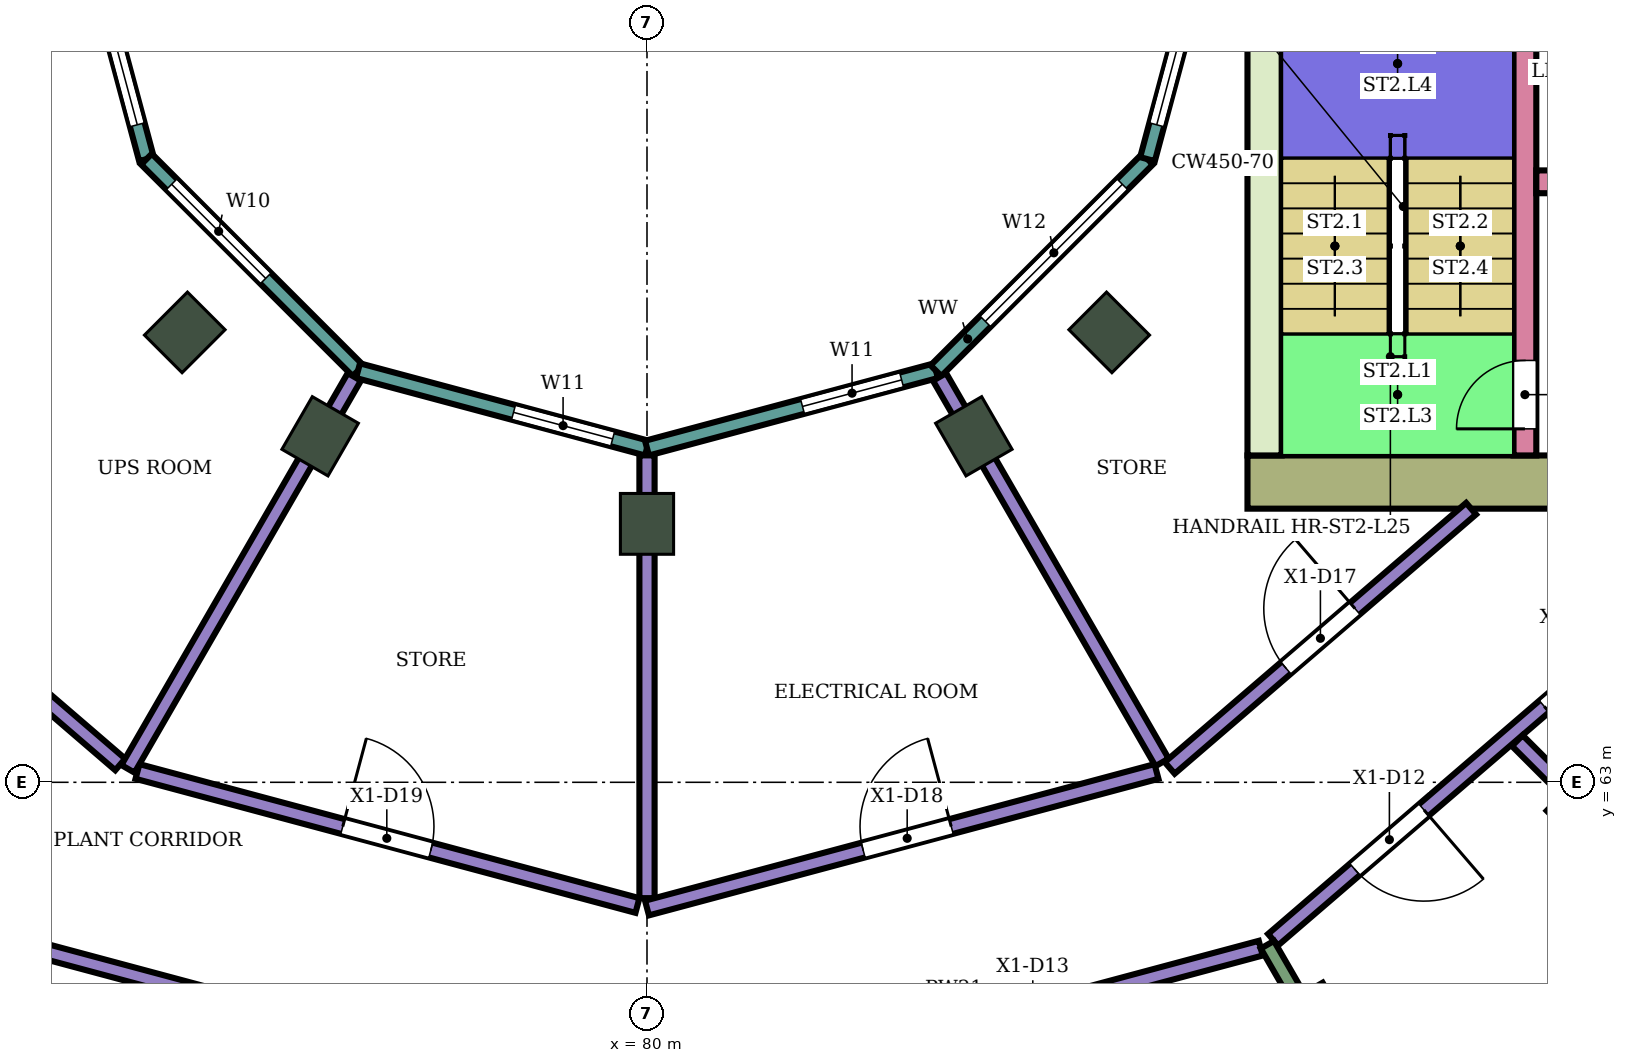
"""IFC4 building model, lengths in metres.
Left out: names, types, materials, properties, quantities, classifications, styles, units other than length and angle.
Written with IfcOpenShell. Run it as: python <this file> out.ifc"""

import sys

from ifc_helpers import new_model, si_unit, direction, frame, frame_2d, origin, origin_2d, place, context, subcontext, project, spatial, rectangle, extrude, element, fill, save


model = new_model("IFC4")
c1 = context("Model", 3, precision=1e-05, world=origin(), true_north=direction((0.0, 1.0)))
c2 = subcontext(c1, "Body", "Model", "MODEL_VIEW")
j1 = project(units=[si_unit("LENGTHUNIT", "METRE"), si_unit("PLANEANGLEUNIT", "RADIAN")], contexts=[c1])
p1 = place(None, origin())
s1 = spatial("IfcSite", under=j1, at=p1, CompositionType="ELEMENT")
p2 = place(p1, origin())
s2 = spatial("IfcBuilding", under=s1, at=p2, CompositionType="ELEMENT")
p3 = place(p2, frame((0.0, 0.0, 109.0)))
s3 = spatial("IfcBuildingStorey", under=s2, at=p3, CompositionType="ELEMENT", Elevation=109.0)
for number, where, z_axis, x_axis in (
    (1, (88.8, 59.758, 0.0), (0.0, 0.0, 1.0), (0.5, -0.866, 0.0)),
    (2, (92.445, 62.555, 0.0), (0.0, 0.0, 1.0), (0.707, -0.707, 0.0)),
):
    element("IfcColumn", number, at=place(p3, frame(where, z_axis=z_axis, x_axis=x_axis)), inside=s3, PredefinedType="COLUMN", context=c2, shape_type="SweptSolid", body=[
        extrude(rectangle(XDim=1.0, YDim=0.8, at=origin_2d()), origin(), (0.0, 0.0, 1.0), 5.6),
    ])
for number, where, z_axis, x_axis in (
    (3, (73.919, 68.919, 0.0), (0.0, 0.0, 1.0), (-0.707, -0.707, 0.0)),
    (4, (75.7, 67.552, 0.0), (0.0, 0.0, 1.0), (-0.5, -0.866, 0.0)),
    (5, (80.0, 66.4, 0.0), (0.0, 0.0, 1.0), (0.0, -1.0, 0.0)),
    (6, (84.3, 67.552, 0.0), (0.0, 0.0, 1.0), (0.5, -0.866, 0.0)),
    (7, (86.081, 68.919, 0.0), (0.0, 0.0, 1.0), (0.707, -0.707, 0.0)),
):
    element("IfcColumn", number, at=place(p3, frame(where, z_axis=z_axis, x_axis=x_axis)), inside=s3, PredefinedType="COLUMN", context=c2, shape_type="SweptSolid", body=[
        extrude(rectangle(XDim=0.8, YDim=0.7, at=origin_2d()), origin(), (0.0, 0.0, 1.0), 5.6),
    ])
p4 = place(p3, frame((87.9, 66.95, 0.0), z_axis=(0.0, 0.0, 1.0), x_axis=(1.0, 0.0, 0.0)))
e8 = element("IfcWall", 8, at=p4, inside=s3, PredefinedType="SHEAR", context=c2, shape_type="SweptSolid", body=[
    extrude(rectangle(XDim=14.8, YDim=0.7, at=frame_2d((7.4, 0.0))), origin(), (0.0, 0.0, 1.0), 5.28),
])
p5 = place(p4, frame((4.2, 0.0, 0.0)))
e9 = element("IfcOpeningElement", 9, at=p5, cuts=e8, PredefinedType="OPENING", context=c2, shape_type="SweptSolid", body=[
    extrude(rectangle(XDim=2.4, YDim=2.4, at=frame_2d((1.2, 1.2))), frame((0.0, 0.36, 0.0), z_axis=(0.0, -1.0, 0.0), x_axis=(1.0, 0.0, 0.0)), (0.0, 0.0, 1.0), 0.72),
])
p6 = place(p3, frame((88.125, 67.3, 0.0), z_axis=(0.0, 0.0, 1.0), x_axis=(0.0, 1.0, 0.0)))
e10 = element("IfcWall", 10, at=p6, inside=s3, PredefinedType="SHEAR", context=c2, shape_type="SweptSolid", body=[
    extrude(rectangle(XDim=7.7, YDim=0.45, at=frame_2d((3.85, 0.0))), origin(), (0.0, 0.0, 1.0), 5.28),
])
p7 = place(p3, frame((91.55, 67.3, 0.0), z_axis=(0.0, 0.0, 1.0), x_axis=(0.0, 1.0, 0.0)))
e11 = element("IfcWall", 11, at=p7, inside=s3, PredefinedType="SHEAR", context=c2, shape_type="SweptSolid", body=[
    extrude(rectangle(XDim=7.7, YDim=0.3, at=frame_2d((3.85, 0.0))), origin(), (0.0, 0.0, 1.0), 5.28),
])
p8 = place(p7, frame((0.35, 0.0, 0.0)))
e12 = element("IfcOpeningElement", 12, at=p8, cuts=e11, PredefinedType="OPENING", context=c2, shape_type="SweptSolid", body=[
    extrude(rectangle(XDim=0.9, YDim=2.1, at=frame_2d((0.45, 1.05))), frame((0.0, 0.16, 0.0), z_axis=(0.0, -1.0, 0.0), x_axis=(1.0, 0.0, 0.0)), (0.0, 0.0, 1.0), 0.32),
])
p9 = place(p3, frame((91.7, 70.9, 0.0), z_axis=(0.0, 0.0, 1.0), x_axis=(1.0, 0.0, 0.0)))
e13 = element("IfcWall", 13, at=p9, inside=s3, PredefinedType="SHEAR", context=c2, shape_type="SweptSolid", body=[
    extrude(rectangle(XDim=11.0, YDim=0.3, at=frame_2d((5.5, 0.0))), origin(), (0.0, 0.0, 1.0), 5.28),
])
p10 = place(p9, frame((0.4, 0.0, 0.0)))
e14 = element("IfcOpeningElement", 14, at=p10, cuts=e13, PredefinedType="OPENING", context=c2, shape_type="SweptSolid", body=[
    extrude(rectangle(XDim=1.4, YDim=2.1, at=frame_2d((0.7, 1.05))), frame((0.0, 0.16, 0.0), z_axis=(0.0, -1.0, 0.0), x_axis=(1.0, 0.0, 0.0)), (0.0, 0.0, 1.0), 0.32),
])
p11 = place(p9, frame((5.4, 0.0, 0.0)))
e15 = element("IfcOpeningElement", 15, at=p11, cuts=e13, PredefinedType="OPENING", context=c2, shape_type="SweptSolid", body=[
    extrude(rectangle(XDim=1.4, YDim=2.1, at=frame_2d((0.7, 1.05))), frame((0.0, 0.16, 0.0), z_axis=(0.0, -1.0, 0.0), x_axis=(1.0, 0.0, 0.0)), (0.0, 0.0, 1.0), 0.32),
])
p12 = place(p9, frame((8.1, 0.0, 0.0)))
e16 = element("IfcOpeningElement", 16, at=p12, cuts=e13, PredefinedType="OPENING", context=c2, shape_type="SweptSolid", body=[
    extrude(rectangle(XDim=1.0, YDim=2.1, at=frame_2d((0.5, 1.05))), frame((0.0, 0.16, 0.0), z_axis=(0.0, -1.0, 0.0), x_axis=(1.0, 0.0, 0.0)), (0.0, 0.0, 1.0), 0.32),
])
p13 = place(p3, frame((72.396, 75.0, 0.0), z_axis=(0.0, 0.0, 1.0), x_axis=(0.258789828301, -0.965933654434, 0.0)))
e17 = element("IfcWall", 17, at=p13, inside=s3, PredefinedType="NOTDEFINED", context=c2, shape_type="SweptSolid", body=[
    extrude(rectangle(XDim=3.936, YDim=0.2, at=frame_2d((1.968, 0.0))), origin(), (0.0, 0.0, 1.0), 5.6),
])
p14 = place(p13, frame((0.468, 0.0, 0.9)))
e18 = element("IfcOpeningElement", 18, at=p14, cuts=e17, PredefinedType="OPENING", context=c2, shape_type="SweptSolid", body=[
    extrude(rectangle(XDim=3.0, YDim=2.3, at=frame_2d((1.5, 1.15))), frame((0.0, 0.11, 0.0), z_axis=(0.0, -1.0, 0.0), x_axis=(1.0, 0.0, 0.0)), (0.0, 0.0, 1.0), 0.22),
])
p15 = place(p3, frame((73.415, 71.198, 0.0), z_axis=(0.0, 0.0, 1.0), x_axis=(0.707106781187, -0.707106781187, 0.0)))
e19 = element("IfcWall", 19, at=p15, inside=s3, PredefinedType="NOTDEFINED", context=c2, shape_type="SweptSolid", body=[
    extrude(rectangle(XDim=3.936, YDim=0.2, at=frame_2d((1.968, 0.0))), origin(), (0.0, 0.0, 1.0), 5.6),
])
p16 = place(p15, frame((0.468, 0.0, 0.9)))
e20 = element("IfcOpeningElement", 20, at=p16, cuts=e19, PredefinedType="OPENING", context=c2, shape_type="SweptSolid", body=[
    extrude(rectangle(XDim=1.75, YDim=2.3, at=frame_2d((0.875, 1.15))), frame((0.0, 0.11, 0.0), z_axis=(0.0, -1.0, 0.0), x_axis=(1.0, 0.0, 0.0)), (0.0, 0.0, 1.0), 0.22),
])
p17 = place(p3, frame((76.198, 68.415, 0.0), z_axis=(0.0, 0.0, 1.0), x_axis=(0.965933654434, -0.258789828301, 0.0)))
e21 = element("IfcWall", 21, at=p17, inside=s3, PredefinedType="NOTDEFINED", context=c2, shape_type="SweptSolid", body=[
    extrude(rectangle(XDim=3.936, YDim=0.2, at=frame_2d((1.968, 0.0))), origin(), (0.0, 0.0, 1.0), 5.6),
])
p18 = place(p17, frame((2.118, 0.0, 0.9)))
e22 = element("IfcOpeningElement", 22, at=p18, cuts=e21, PredefinedType="OPENING", context=c2, shape_type="SweptSolid", body=[
    extrude(rectangle(XDim=1.35, YDim=2.3, at=frame_2d((0.675, 1.15))), frame((0.0, 0.11, 0.0), z_axis=(0.0, -1.0, 0.0), x_axis=(1.0, 0.0, 0.0)), (0.0, 0.0, 1.0), 0.22),
])
p19 = place(p3, frame((80.0, 67.396, 0.0), z_axis=(0.0, 0.0, 1.0), x_axis=(0.965933654434, 0.258789828301, 0.0)))
e23 = element("IfcWall", 23, at=p19, inside=s3, PredefinedType="NOTDEFINED", context=c2, shape_type="SweptSolid", body=[
    extrude(rectangle(XDim=3.936, YDim=0.2, at=frame_2d((1.968, 0.0))), origin(), (0.0, 0.0, 1.0), 5.6),
])
p20 = place(p19, frame((2.118, 0.0, 0.9)))
e24 = element("IfcOpeningElement", 24, at=p20, cuts=e23, PredefinedType="OPENING", context=c2, shape_type="SweptSolid", body=[
    extrude(rectangle(XDim=1.35, YDim=2.3, at=frame_2d((0.675, 1.15))), frame((0.0, 0.11, 0.0), z_axis=(0.0, -1.0, 0.0), x_axis=(1.0, 0.0, 0.0)), (0.0, 0.0, 1.0), 0.22),
])
p21 = place(p3, frame((83.802, 68.415, 0.0), z_axis=(0.0, 0.0, 1.0), x_axis=(0.707106781187, 0.707106781187, 0.0)))
e25 = element("IfcWall", 25, at=p21, inside=s3, PredefinedType="NOTDEFINED", context=c2, shape_type="SweptSolid", body=[
    extrude(rectangle(XDim=3.936, YDim=0.2, at=frame_2d((1.968, 0.0))), origin(), (0.0, 0.0, 1.0), 5.6),
])
p22 = place(p21, frame((0.918, 0.0, 0.9)))
e26 = element("IfcOpeningElement", 26, at=p22, cuts=e25, PredefinedType="OPENING", context=c2, shape_type="SweptSolid", body=[
    extrude(rectangle(XDim=2.55, YDim=2.3, at=frame_2d((1.275, 1.15))), frame((0.0, 0.11, 0.0), z_axis=(0.0, -1.0, 0.0), x_axis=(1.0, 0.0, 0.0)), (0.0, 0.0, 1.0), 0.22),
])
p23 = place(p3, frame((86.585, 71.198, 0.0), z_axis=(0.0, 0.0, 1.0), x_axis=(0.258789828301, 0.965933654434, 0.0)))
e27 = element("IfcWall", 27, at=p23, inside=s3, PredefinedType="NOTDEFINED", context=c2, shape_type="SweptSolid", body=[
    extrude(rectangle(XDim=3.936, YDim=0.2, at=frame_2d((1.968, 0.0))), origin(), (0.0, 0.0, 1.0), 5.6),
])
p24 = place(p23, frame((0.468, 0.0, 0.9)))
e28 = element("IfcOpeningElement", 28, at=p24, cuts=e27, PredefinedType="OPENING", context=c2, shape_type="SweptSolid", body=[
    extrude(rectangle(XDim=3.0, YDim=2.3, at=frame_2d((1.5, 1.15))), frame((0.0, 0.11, 0.0), z_axis=(0.0, -1.0, 0.0), x_axis=(1.0, 0.0, 0.0)), (0.0, 0.0, 1.0), 0.22),
])
p25 = place(p3, frame((69.158, 66.6, 0.0), z_axis=(0.0, 0.0, 1.0), x_axis=(0.758063092745, -0.652181222835, 0.0)))
e29 = element("IfcWall", 29, at=p25, inside=s3, PredefinedType="PARTITIONING", context=c2, shape_type="SweptSolid", body=[
    extrude(rectangle(XDim=5.16, YDim=0.2, at=frame_2d((2.58, 0.0))), origin(), (0.0, 0.0, 1.0), 5.15),
])
p26 = place(p25, frame((2.015, 0.0, 0.0)))
e30 = element("IfcOpeningElement", 30, at=p26, cuts=e29, PredefinedType="OPENING", context=c2, shape_type="SweptSolid", body=[
    extrude(rectangle(XDim=1.2, YDim=2.4, at=frame_2d((0.6, 1.2))), frame((0.0, 0.11, 0.0), z_axis=(0.0, -1.0, 0.0), x_axis=(1.0, 0.0, 0.0)), (0.0, 0.0, 1.0), 0.22),
])
p27 = place(p3, frame((71.877, 60.831, 0.0), z_axis=(0.0, 0.0, 1.0), x_axis=(0.965893155099, -0.258940944876, 0.0)))
e31 = element("IfcWall", 31, at=p27, inside=s3, PredefinedType="PARTITIONING", context=c2, shape_type="SweptSolid", body=[
    extrude(rectangle(XDim=8.32, YDim=0.2, at=frame_2d((4.16, 0.0))), origin(), (0.0, 0.0, 1.0), 5.15),
])
p28 = place(p27, frame((5.685, 0.0, 0.0)))
e32 = element("IfcOpeningElement", 32, at=p28, cuts=e31, PredefinedType="OPENING", context=c2, shape_type="SweptSolid", body=[
    extrude(rectangle(XDim=1.2, YDim=2.4, at=frame_2d((0.6, 1.2))), frame((0.0, 0.11, 0.0), z_axis=(0.0, -1.0, 0.0), x_axis=(1.0, 0.0, 0.0)), (0.0, 0.0, 1.0), 0.22),
])
p29 = place(p3, frame((73.297, 63.143, 0.0), z_axis=(0.0, 0.0, 1.0), x_axis=(0.965899714105, -0.258916477443, 0.0)))
e33 = element("IfcWall", 33, at=p29, inside=s3, PredefinedType="PARTITIONING", context=c2, shape_type="SweptSolid", body=[
    extrude(rectangle(XDim=6.81, YDim=0.2, at=frame_2d((3.405, 0.0))), origin(), (0.0, 0.0, 1.0), 5.15),
])
p30 = place(p29, frame((2.796, 0.0, 0.0)))
e34 = element("IfcOpeningElement", 34, at=p30, cuts=e33, PredefinedType="OPENING", context=c2, shape_type="SweptSolid", body=[
    extrude(rectangle(XDim=1.2, YDim=2.4, at=frame_2d((0.6, 1.2))), frame((0.0, 0.11, 0.0), z_axis=(0.0, -1.0, 0.0), x_axis=(1.0, 0.0, 0.0)), (0.0, 0.0, 1.0), 0.22),
])
p31 = place(p3, frame((73.172, 63.177, 0.0), z_axis=(0.0, 0.0, 1.0), x_axis=(0.500080872431, 0.86597870703, 0.0)))
e35 = element("IfcWall", 35, at=p31, inside=s3, PredefinedType="PARTITIONING", context=c2, shape_type="SweptSolid", body=[
    extrude(rectangle(XDim=5.955, YDim=0.2, at=frame_2d((2.978, 0.0))), origin(), (0.0, 0.0, 1.0), 5.15),
])
p32 = place(p3, frame((80.0, 58.654, 0.0), z_axis=(0.0, 0.0, 1.0), x_axis=(0.965905026676, 0.258896657842, 0.0)))
e36 = element("IfcWall", 36, at=p32, inside=s3, PredefinedType="PARTITIONING", context=c2, shape_type="SweptSolid", body=[
    extrude(rectangle(XDim=8.36, YDim=0.2, at=frame_2d((4.18, 0.0))), origin(), (0.0, 0.0, 1.0), 5.15),
])
p33 = place(p32, frame((4.655, 0.0, 0.0)))
e37 = element("IfcOpeningElement", 37, at=p33, cuts=e36, PredefinedType="OPENING", context=c2, shape_type="SweptSolid", body=[
    extrude(rectangle(XDim=1.2, YDim=2.4, at=frame_2d((0.6, 1.2))), frame((0.0, 0.11, 0.0), z_axis=(0.0, -1.0, 0.0), x_axis=(1.0, 0.0, 0.0)), (0.0, 0.0, 1.0), 0.22),
])
p34 = place(p3, frame((80.0, 61.476, 0.0), z_axis=(0.0, 0.0, 1.0), x_axis=(0.0, 1.0, 0.0)))
e38 = element("IfcWall", 38, at=p34, inside=s3, PredefinedType="PARTITIONING", context=c2, shape_type="SweptSolid", body=[
    extrude(rectangle(XDim=5.825, YDim=0.2, at=frame_2d((2.913, 0.0))), origin(), (0.0, 0.0, 1.0), 5.15),
])
p35 = place(p3, frame((80.0, 61.346, 0.0), z_axis=(0.0, 0.0, 1.0), x_axis=(0.965915385935, 0.25885800589, 0.0)))
e39 = element("IfcWall", 39, at=p35, inside=s3, PredefinedType="PARTITIONING", context=c2, shape_type="SweptSolid", body=[
    extrude(rectangle(XDim=6.94, YDim=0.2, at=frame_2d((3.47, 0.0))), origin(), (0.0, 0.0, 1.0), 5.15),
])
p36 = place(p35, frame((2.944, 0.0, 0.0)))
e40 = element("IfcOpeningElement", 40, at=p36, cuts=e39, PredefinedType="OPENING", context=c2, shape_type="SweptSolid", body=[
    extrude(rectangle(XDim=1.2, YDim=2.4, at=frame_2d((0.6, 1.2))), frame((0.0, 0.11, 0.0), z_axis=(0.0, -1.0, 0.0), x_axis=(1.0, 0.0, 0.0)), (0.0, 0.0, 1.0), 0.22),
])
p37 = place(p3, frame((83.849, 68.333, 0.0), z_axis=(0.0, 0.0, 1.0), x_axis=(0.499951054106, -0.866053660865, 0.0)))
e41 = element("IfcWall", 41, at=p37, inside=s3, PredefinedType="PARTITIONING", context=c2, shape_type="SweptSolid", body=[
    extrude(rectangle(XDim=5.855, YDim=0.2, at=frame_2d((2.927, 0.0))), origin(), (0.0, 0.0, 1.0), 5.15),
])
p38 = place(p3, frame((86.877, 63.189, 0.0), z_axis=(0.0, 0.0, 1.0), x_axis=(0.758075808328, 0.652166442581, 0.0)))
e42 = element("IfcWall", 42, at=p38, inside=s3, PredefinedType="PARTITIONING", context=c2, shape_type="SweptSolid", body=[
    extrude(rectangle(XDim=5.23, YDim=0.2, at=frame_2d((2.615, 0.0))), origin(), (0.0, 0.0, 1.0), 5.15),
])
p39 = place(p38, frame((2.015, 0.0, 0.0)))
e43 = element("IfcOpeningElement", 43, at=p39, cuts=e42, PredefinedType="OPENING", context=c2, shape_type="SweptSolid", body=[
    extrude(rectangle(XDim=1.2, YDim=2.4, at=frame_2d((0.6, 1.2))), frame((0.0, 0.11, 0.0), z_axis=(0.0, -1.0, 0.0), x_axis=(1.0, 0.0, 0.0)), (0.0, 0.0, 1.0), 0.22),
])
p40 = place(p3, frame((88.237, 60.929, 0.0), z_axis=(0.0, 0.0, 1.0), x_axis=(0.758121184653, 0.6521136936, 0.0)))
e44 = element("IfcWall", 44, at=p40, inside=s3, PredefinedType="PARTITIONING", context=c2, shape_type="SweptSolid", body=[
    extrude(rectangle(XDim=6.336, YDim=0.2, at=frame_2d((3.168, 0.0))), origin(), (0.0, 0.0, 1.0), 5.15),
])
p41 = place(p40, frame((4.707, 0.0, 0.0)))
e45 = element("IfcOpeningElement", 45, at=p41, cuts=e44, PredefinedType="OPENING", context=c2, shape_type="SweptSolid", body=[
    extrude(rectangle(XDim=1.1, YDim=2.1, at=frame_2d((0.55, 1.05))), frame((0.0, 0.11, 0.0), z_axis=(0.0, -1.0, 0.0), x_axis=(1.0, 0.0, 0.0)), (0.0, 0.0, 1.0), 0.22),
])
p42 = place(p40, frame((1.419, 0.0, 0.0)))
e46 = element("IfcOpeningElement", 46, at=p42, cuts=e44, PredefinedType="OPENING", context=c2, shape_type="SweptSolid", body=[
    extrude(rectangle(XDim=1.2, YDim=2.4, at=frame_2d((0.6, 1.2))), frame((0.0, 0.11, 0.0), z_axis=(0.0, -1.0, 0.0), x_axis=(1.0, 0.0, 0.0)), (0.0, 0.0, 1.0), 0.22),
])
p43 = place(p3, frame((88.162, 60.863, 0.0), z_axis=(0.0, 0.0, 1.0), x_axis=(0.499991628305, -0.866030237131, 0.0)))
e47 = element("IfcWall", 47, at=p43, inside=s3, PredefinedType="PARTITIONING", context=c2, shape_type="SweptSolid", body=[
    extrude(rectangle(XDim=9.474, YDim=0.2, at=frame_2d((4.737, 0.0))), origin(), (0.0, 0.0, 1.0), 4.586),
])
p44 = place(p3, frame((91.45, 63.548, 0.0), z_axis=(0.0, 0.0, 1.0), x_axis=(0.707037084594, -0.70717647091, 0.0)))
e48 = element("IfcWall", 48, at=p44, inside=s3, PredefinedType="PARTITIONING", context=c2, shape_type="SweptSolid", body=[
    extrude(rectangle(XDim=7.006, YDim=0.2, at=frame_2d((3.503, 0.0))), origin(), (0.0, 0.0, 1.0), 5.15),
])
p45 = place(p14, origin())
e49 = element("IfcWindow", 49, at=p45, inside=s3, PartitioningType="SINGLE_PANEL", PredefinedType="WINDOW", context=c2, shape_type="SweptSolid", body=[
    extrude(rectangle(XDim=3.0, YDim=2.3, at=frame_2d((1.5, 1.15))), frame((0.0, 0.03, 0.0), z_axis=(0.0, -1.0, 0.0), x_axis=(1.0, 0.0, 0.0)), (0.0, 0.0, 1.0), 0.06),
])
fill(e18, e49)
p46 = place(p16, origin())
e50 = element("IfcWindow", 50, at=p46, inside=s3, PartitioningType="SINGLE_PANEL", PredefinedType="WINDOW", context=c2, shape_type="SweptSolid", body=[
    extrude(rectangle(XDim=1.75, YDim=2.3, at=frame_2d((0.875, 1.15))), frame((0.0, 0.03, 0.0), z_axis=(0.0, -1.0, 0.0), x_axis=(1.0, 0.0, 0.0)), (0.0, 0.0, 1.0), 0.06),
])
fill(e20, e50)
p47 = place(p18, origin())
e51 = element("IfcWindow", 51, at=p47, inside=s3, PartitioningType="SINGLE_PANEL", PredefinedType="WINDOW", context=c2, shape_type="SweptSolid", body=[
    extrude(rectangle(XDim=1.35, YDim=2.3, at=frame_2d((0.675, 1.15))), frame((0.0, 0.03, 0.0), z_axis=(0.0, -1.0, 0.0), x_axis=(1.0, 0.0, 0.0)), (0.0, 0.0, 1.0), 0.06),
])
fill(e22, e51)
p48 = place(p20, origin())
e52 = element("IfcWindow", 52, at=p48, inside=s3, PartitioningType="SINGLE_PANEL", PredefinedType="WINDOW", context=c2, shape_type="SweptSolid", body=[
    extrude(rectangle(XDim=1.35, YDim=2.3, at=frame_2d((0.675, 1.15))), frame((0.0, 0.03, 0.0), z_axis=(0.0, -1.0, 0.0), x_axis=(1.0, 0.0, 0.0)), (0.0, 0.0, 1.0), 0.06),
])
fill(e24, e52)
p49 = place(p22, origin())
e53 = element("IfcWindow", 53, at=p49, inside=s3, PartitioningType="SINGLE_PANEL", PredefinedType="WINDOW", context=c2, shape_type="SweptSolid", body=[
    extrude(rectangle(XDim=2.55, YDim=2.3, at=frame_2d((1.275, 1.15))), frame((0.0, 0.03, 0.0), z_axis=(0.0, -1.0, 0.0), x_axis=(1.0, 0.0, 0.0)), (0.0, 0.0, 1.0), 0.06),
])
fill(e26, e53)
p50 = place(p24, origin())
e54 = element("IfcWindow", 54, at=p50, inside=s3, PartitioningType="SINGLE_PANEL", PredefinedType="WINDOW", context=c2, shape_type="SweptSolid", body=[
    extrude(rectangle(XDim=3.0, YDim=2.3, at=frame_2d((1.5, 1.15))), frame((0.0, 0.03, 0.0), z_axis=(0.0, -1.0, 0.0), x_axis=(1.0, 0.0, 0.0)), (0.0, 0.0, 1.0), 0.06),
])
fill(e28, e54)
p51 = place(p41, frame((1.1, 0.0, 0.0), z_axis=(0.0, 0.0, 1.0), x_axis=(-1.0, 0.0, 0.0)))
e55 = element("IfcDoor", 55, at=p51, inside=s3, OperationType="SINGLE_SWING_RIGHT", PredefinedType="DOOR", context=c2, shape_type="SweptSolid", body=[
    extrude(rectangle(XDim=1.1, YDim=2.1, at=frame_2d((0.55, 1.05))), frame((0.0, 0.025, 0.0), z_axis=(0.0, -1.0, 0.0), x_axis=(1.0, 0.0, 0.0)), (0.0, 0.0, 1.0), 0.05),
])
fill(e45, e55)
p52 = place(p42, frame((1.2, 0.0, 0.0), z_axis=(0.0, 0.0, 1.0), x_axis=(-1.0, 0.0, 0.0)))
e56 = element("IfcDoor", 56, at=p52, inside=s3, OperationType="SINGLE_SWING_LEFT", PredefinedType="DOOR", context=c2, shape_type="SweptSolid", body=[
    extrude(rectangle(XDim=1.2, YDim=2.4, at=frame_2d((0.6, 1.2))), frame((0.0, 0.025, 0.0), z_axis=(0.0, -1.0, 0.0), x_axis=(1.0, 0.0, 0.0)), (0.0, 0.0, 1.0), 0.05),
])
fill(e46, e56)
p53 = place(p39, origin())
e57 = element("IfcDoor", 57, at=p53, inside=s3, OperationType="SINGLE_SWING_RIGHT", PredefinedType="DOOR", context=c2, shape_type="SweptSolid", body=[
    extrude(rectangle(XDim=1.2, YDim=2.4, at=frame_2d((0.6, 1.2))), frame((0.0, 0.025, 0.0), z_axis=(0.0, -1.0, 0.0), x_axis=(1.0, 0.0, 0.0)), (0.0, 0.0, 1.0), 0.05),
])
fill(e43, e57)
p54 = place(p36, origin())
e58 = element("IfcDoor", 58, at=p54, inside=s3, OperationType="SINGLE_SWING_RIGHT", PredefinedType="DOOR", context=c2, shape_type="SweptSolid", body=[
    extrude(rectangle(XDim=1.2, YDim=2.4, at=frame_2d((0.6, 1.2))), frame((0.0, 0.025, 0.0), z_axis=(0.0, -1.0, 0.0), x_axis=(1.0, 0.0, 0.0)), (0.0, 0.0, 1.0), 0.05),
])
fill(e40, e58)
p55 = place(p30, origin())
e59 = element("IfcDoor", 59, at=p55, inside=s3, OperationType="SINGLE_SWING_LEFT", PredefinedType="DOOR", context=c2, shape_type="SweptSolid", body=[
    extrude(rectangle(XDim=1.2, YDim=2.4, at=frame_2d((0.6, 1.2))), frame((0.0, 0.025, 0.0), z_axis=(0.0, -1.0, 0.0), x_axis=(1.0, 0.0, 0.0)), (0.0, 0.0, 1.0), 0.05),
])
fill(e34, e59)
p56 = place(p8, origin())
e60 = element("IfcDoor", 60, at=p56, inside=s3, OperationType="SINGLE_SWING_LEFT", PredefinedType="DOOR", context=c2, shape_type="SweptSolid", body=[
    extrude(rectangle(XDim=0.9, YDim=2.1, at=frame_2d((0.45, 1.05))), frame((0.0, 0.025, 0.0), z_axis=(0.0, -1.0, 0.0), x_axis=(1.0, 0.0, 0.0)), (0.0, 0.0, 1.0), 0.05),
])
fill(e12, e60)
save(model, sys.argv[1])
